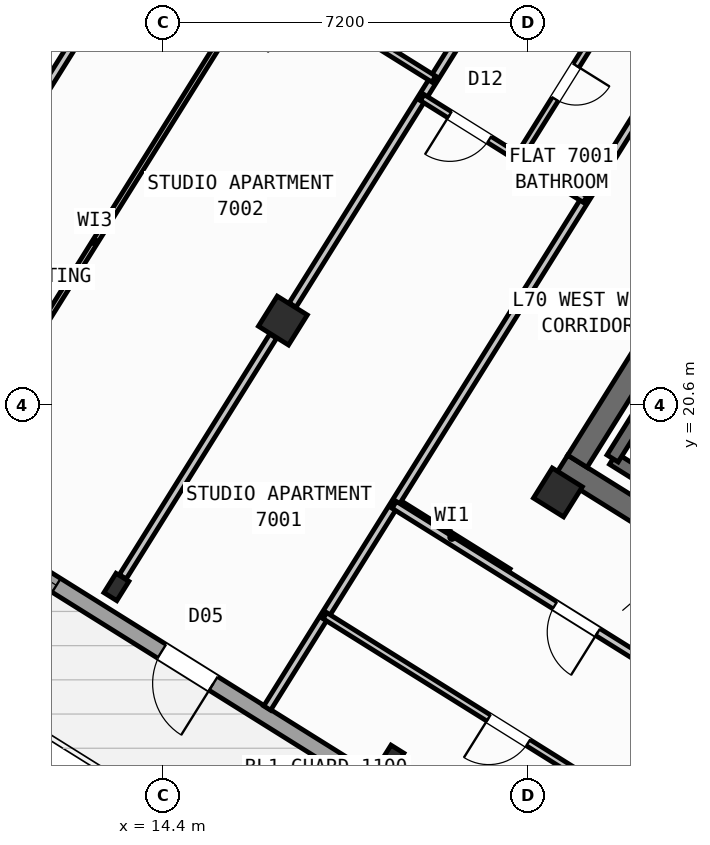
"""IFC4 building model, lengths in metres.
Left out: names, types, materials, properties, quantities, classifications, styles, units other than length and angle.
Written with IfcOpenShell. Run it as: python <this file> out.ifc"""

import sys

from ifc_helpers import new_model, si_unit, direction, frame, frame_2d, origin, origin_2d, place, context, subcontext, project, spatial, rectangle, hollow_rectangle, i_section, extrude, source, transform, mapped, element, fill, save


model = new_model("IFC4")
c1 = context("Model", 3, precision=1e-05, world=origin(), true_north=direction((0.0, 1.0)))
c2 = subcontext(c1, "Body", "Model", "MODEL_VIEW")
j1 = project(units=[si_unit("LENGTHUNIT", "METRE"), si_unit("PLANEANGLEUNIT", "RADIAN")], contexts=[c1])
p1 = place(None, origin())
s1 = spatial("IfcSite", under=j1, at=p1, CompositionType="ELEMENT")
p2 = place(p1, origin())
s2 = spatial("IfcBuilding", under=s1, at=p2, CompositionType="ELEMENT")
p3 = place(p2, frame((0.0, 0.0, 277.2)))
s3 = spatial("IfcBuildingStorey", under=s2, at=p3, CompositionType="ELEMENT", Elevation=277.2)
p4 = place(p3, frame((33.324, 12.503, 0.0), z_axis=(0.0, 0.0, 1.0), x_axis=(-0.848043529849, 0.529926571782, 0.0)))
e1 = element("IfcWall", 1, at=p4, inside=s3, PredefinedType="SHEAR", context=c2, shape_type="SweptSolid", body=[
    extrude(rectangle(XDim=13.04, YDim=0.45, at=frame_2d((6.52, 0.0))), origin(), (0.0, 0.0, 1.0), 3.35),
])
p5 = place(p3, frame((26.007, 24.976, 0.0), z_axis=(0.0, 0.0, 1.0), x_axis=(-0.529931155655, -0.848040665456, 0.0)))
e2 = element("IfcWall", 2, at=p5, inside=s3, PredefinedType="SHEAR", context=c2, shape_type="SweptSolid", body=[
    extrude(rectangle(XDim=6.475, YDim=0.45, at=frame_2d((3.238, 0.0))), origin(), (0.0, 0.0, 1.0), 3.35),
])
m1 = source(origin(), c2, "Body", "SweptSolid", [
    extrude(hollow_rectangle(XDim=0.7, YDim=0.7, WallThickness=0.028, at=origin_2d()), origin(), (0.0, 0.0, 1.0), 3.6),
])
p6 = place(p3, frame((22.191, 18.87, 0.0), z_axis=(0.0, 0.0, 1.0), x_axis=(-0.848048096156, 0.529919264233, 0.0)))
e3 = element("IfcColumn", 3, at=p6, inside=s3, PredefinedType="COLUMN", context=c2, shape_type="MappedRepresentation", body=[
    mapped(m1, transform((0.0, 0.0, 0.0), scale=1.0)),
])
m2 = source(origin(), c2, "Body", "SweptSolid", [
    extrude(i_section(OverallWidth=0.3, OverallDepth=0.45, WebThickness=0.014, FlangeThickness=0.026, at=origin_2d()), origin(), (0.0, 0.0, 1.0), 3.6),
])
p7 = place(p3, frame((18.906, 13.612, 0.0), z_axis=(0.0, 0.0, 1.0), x_axis=(-0.848048096156, 0.529919264233, 0.0)))
e4 = element("IfcColumn", 4, at=p7, inside=s3, PredefinedType="COLUMN", context=c2, shape_type="MappedRepresentation", body=[
    mapped(m2, transform((0.0, 0.0, 0.0), scale=1.0)),
])
p8 = place(p3, frame((16.764, 22.261, 0.0), z_axis=(0.0, 0.0, 1.0), x_axis=(-0.848048096156, 0.529919264233, 0.0)))
e5 = element("IfcColumn", 5, at=p8, inside=s3, PredefinedType="COLUMN", context=c2, shape_type="MappedRepresentation", body=[
    mapped(m1, transform((0.0, 0.0, 0.0), scale=1.0)),
])
p9 = place(p3, frame((13.478, 17.003, 0.0), z_axis=(0.0, 0.0, 1.0), x_axis=(-0.848048096156, 0.529919264233, 0.0)))
e6 = element("IfcColumn", 6, at=p9, inside=s3, PredefinedType="COLUMN", context=c2, shape_type="MappedRepresentation", body=[
    mapped(m2, transform((0.0, 0.0, 0.0), scale=1.0)),
])
p10 = place(p3, frame((29.268, 6.429, 0.0), z_axis=(0.0, 0.0, 1.0), x_axis=(-0.848049971435, 0.529916263149, 0.0)))
e7 = element("IfcWall", 7, at=p10, inside=s3, PredefinedType="STANDARD", context=c2, shape_type="SweptSolid", body=[
    extrude(rectangle(XDim=31.588, YDim=0.32, at=frame_2d((15.794, 0.0))), origin(), (0.0, 0.0, 1.0), 3.35),
])
p11 = place(p10, frame((16.362, 0.0, 0.0)))
e8 = element("IfcOpeningElement", 8, at=p11, cuts=e7, PredefinedType="OPENING", context=c2, shape_type="SweptSolid", body=[
    extrude(rectangle(XDim=1.2, YDim=2.15, at=frame_2d((0.6, 1.075))), frame((0.0, 0.17, 0.0), z_axis=(0.0, -1.0, 0.0), x_axis=(1.0, 0.0, 0.0)), (0.0, 0.0, 1.0), 0.34),
])
p12 = place(p10, frame((3.859, 0.0, 0.9)))
e9 = element("IfcOpeningElement", 9, at=p12, cuts=e7, PredefinedType="OPENING", context=c2, shape_type="SweptSolid", body=[
    extrude(rectangle(XDim=1.65, YDim=1.45, at=frame_2d((0.825, 0.725))), frame((0.0, 0.17, 0.0), z_axis=(0.0, -1.0, 0.0), x_axis=(1.0, 0.0, 0.0)), (0.0, 0.0, 1.0), 0.34),
])
p13 = place(p10, frame((10.519, 0.0, 0.9)))
e10 = element("IfcOpeningElement", 10, at=p13, cuts=e7, PredefinedType="OPENING", context=c2, shape_type="SweptSolid", body=[
    extrude(rectangle(XDim=1.65, YDim=1.45, at=frame_2d((0.825, 0.725))), frame((0.0, 0.17, 0.0), z_axis=(0.0, -1.0, 0.0), x_axis=(1.0, 0.0, 0.0)), (0.0, 0.0, 1.0), 0.34),
])
p14 = place(p10, frame((20.015, 0.0, 0.95)))
e11 = element("IfcOpeningElement", 11, at=p14, cuts=e7, PredefinedType="OPENING", context=c2, shape_type="SweptSolid", body=[
    extrude(rectangle(XDim=1.95, YDim=1.35, at=frame_2d((0.975, 0.675))), frame((0.0, 0.17, 0.0), z_axis=(0.0, -1.0, 0.0), x_axis=(1.0, 0.0, 0.0)), (0.0, 0.0, 1.0), 0.34),
])
p15 = place(p10, frame((23.715, 0.0, 1.0)))
e12 = element("IfcOpeningElement", 12, at=p15, cuts=e7, PredefinedType="OPENING", context=c2, shape_type="SweptSolid", body=[
    extrude(rectangle(XDim=0.9, YDim=1.25, at=frame_2d((0.45, 0.625))), frame((0.0, 0.17, 0.0), z_axis=(0.0, -1.0, 0.0), x_axis=(1.0, 0.0, 0.0)), (0.0, 0.0, 1.0), 0.34),
])
p16 = place(p10, frame((27.706, 0.0, 0.9)))
e13 = element("IfcOpeningElement", 13, at=p16, cuts=e7, PredefinedType="OPENING", context=c2, shape_type="SweptSolid", body=[
    extrude(rectangle(XDim=1.65, YDim=1.45, at=frame_2d((0.825, 0.725))), frame((0.0, 0.17, 0.0), z_axis=(0.0, -1.0, 0.0), x_axis=(1.0, 0.0, 0.0)), (0.0, 0.0, 1.0), 0.34),
])
p17 = place(p3, frame((2.415, 23.452, 0.0), z_axis=(0.0, 0.0, 1.0), x_axis=(0.52991049553, 0.848053575387, 0.0)))
e14 = element("IfcWall", 14, at=p17, inside=s3, PredefinedType="STANDARD", context=c2, shape_type="SweptSolid", body=[
    extrude(rectangle(XDim=21.587, YDim=0.32, at=frame_2d((10.794, 0.0))), origin(), (0.0, 0.0, 1.0), 3.35),
])
p18 = place(p17, frame((2.368, 0.0, 0.9)))
e15 = element("IfcOpeningElement", 15, at=p18, cuts=e14, PredefinedType="OPENING", context=c2, shape_type="SweptSolid", body=[
    extrude(rectangle(XDim=1.65, YDim=1.45, at=frame_2d((0.825, 0.725))), frame((0.0, 0.17, 0.0), z_axis=(0.0, -1.0, 0.0), x_axis=(1.0, 0.0, 0.0)), (0.0, 0.0, 1.0), 0.34),
])
p19 = place(p17, frame((8.094, 0.0, 0.9)))
e16 = element("IfcOpeningElement", 16, at=p19, cuts=e14, PredefinedType="OPENING", context=c2, shape_type="SweptSolid", body=[
    extrude(rectangle(XDim=1.35, YDim=1.45, at=frame_2d((0.675, 0.725))), frame((0.0, 0.17, 0.0), z_axis=(0.0, -1.0, 0.0), x_axis=(1.0, 0.0, 0.0)), (0.0, 0.0, 1.0), 0.34),
])
p20 = place(p17, frame((11.044, 0.0, 0.9)))
e17 = element("IfcOpeningElement", 17, at=p20, cuts=e14, PredefinedType="OPENING", context=c2, shape_type="SweptSolid", body=[
    extrude(rectangle(XDim=1.35, YDim=1.45, at=frame_2d((0.675, 0.725))), frame((0.0, 0.17, 0.0), z_axis=(0.0, -1.0, 0.0), x_axis=(1.0, 0.0, 0.0)), (0.0, 0.0, 1.0), 0.34),
])
p21 = place(p17, frame((18.809, 0.0, 1.0)))
e18 = element("IfcOpeningElement", 18, at=p21, cuts=e14, PredefinedType="OPENING", context=c2, shape_type="SweptSolid", body=[
    extrude(rectangle(XDim=0.9, YDim=1.25, at=frame_2d((0.45, 0.625))), frame((0.0, 0.17, 0.0), z_axis=(0.0, -1.0, 0.0), x_axis=(1.0, 0.0, 0.0)), (0.0, 0.0, 1.0), 0.34),
])
p22 = place(p3, frame((14.138, 41.825, 0.0), z_axis=(0.0, 0.0, 1.0), x_axis=(0.848046498049, -0.529921821731, 0.0)))
e19 = element("IfcWall", 19, at=p22, inside=s3, PredefinedType="STANDARD", context=c2, shape_type="SweptSolid", body=[
    extrude(rectangle(XDim=31.588, YDim=0.32, at=frame_2d((15.794, 0.0))), origin(), (0.0, 0.0, 1.0), 3.35),
])
p23 = place(p22, frame((3.568, 0.0, 0.0)))
e20 = element("IfcOpeningElement", 20, at=p23, cuts=e19, PredefinedType="OPENING", context=c2, shape_type="SweptSolid", body=[
    extrude(rectangle(XDim=1.05, YDim=2.15, at=frame_2d((0.525, 1.075))), frame((0.0, 0.17, 0.0), z_axis=(0.0, -1.0, 0.0), x_axis=(1.0, 0.0, 0.0)), (0.0, 0.0, 1.0), 0.34),
])
p24 = place(p22, frame((1.046, 0.0, 0.9)))
e21 = element("IfcOpeningElement", 21, at=p24, cuts=e19, PredefinedType="OPENING", context=c2, shape_type="SweptSolid", body=[
    extrude(rectangle(XDim=1.65, YDim=1.45, at=frame_2d((0.825, 0.725))), frame((0.0, 0.17, 0.0), z_axis=(0.0, -1.0, 0.0), x_axis=(1.0, 0.0, 0.0)), (0.0, 0.0, 1.0), 0.34),
])
p25 = place(p22, frame((8.61, 0.0, 0.9)))
e22 = element("IfcOpeningElement", 22, at=p25, cuts=e19, PredefinedType="OPENING", context=c2, shape_type="SweptSolid", body=[
    extrude(rectangle(XDim=1.35, YDim=1.45, at=frame_2d((0.675, 0.725))), frame((0.0, 0.17, 0.0), z_axis=(0.0, -1.0, 0.0), x_axis=(1.0, 0.0, 0.0)), (0.0, 0.0, 1.0), 0.34),
])
p26 = place(p22, frame((13.599, 0.0, 0.95)))
e23 = element("IfcOpeningElement", 23, at=p26, cuts=e19, PredefinedType="OPENING", context=c2, shape_type="SweptSolid", body=[
    extrude(rectangle(XDim=1.95, YDim=1.35, at=frame_2d((0.975, 0.675))), frame((0.0, 0.17, 0.0), z_axis=(0.0, -1.0, 0.0), x_axis=(1.0, 0.0, 0.0)), (0.0, 0.0, 1.0), 0.34),
])
p27 = place(p22, frame((17.154, 0.0, 1.0)))
e24 = element("IfcOpeningElement", 24, at=p27, cuts=e19, PredefinedType="OPENING", context=c2, shape_type="SweptSolid", body=[
    extrude(rectangle(XDim=0.9, YDim=1.25, at=frame_2d((0.45, 0.625))), frame((0.0, 0.17, 0.0), z_axis=(0.0, -1.0, 0.0), x_axis=(1.0, 0.0, 0.0)), (0.0, 0.0, 1.0), 0.34),
])
p28 = place(p22, frame((21.719, 0.0, 0.9)))
e25 = element("IfcOpeningElement", 25, at=p28, cuts=e19, PredefinedType="OPENING", context=c2, shape_type="SweptSolid", body=[
    extrude(rectangle(XDim=1.65, YDim=1.45, at=frame_2d((0.825, 0.725))), frame((0.0, 0.17, 0.0), z_axis=(0.0, -1.0, 0.0), x_axis=(1.0, 0.0, 0.0)), (0.0, 0.0, 1.0), 0.34),
])
p29 = place(p22, frame((27.419, 0.0, 0.9)))
e26 = element("IfcOpeningElement", 26, at=p29, cuts=e19, PredefinedType="OPENING", context=c2, shape_type="SweptSolid", body=[
    extrude(rectangle(XDim=1.65, YDim=1.45, at=frame_2d((0.825, 0.725))), frame((0.0, 0.17, 0.0), z_axis=(0.0, -1.0, 0.0), x_axis=(1.0, 0.0, 0.0)), (0.0, 0.0, 1.0), 0.34),
])
p30 = place(p3, frame((29.605, 15.581, 0.0), z_axis=(0.0, 0.0, 1.0), x_axis=(-0.848036911448, 0.529937163087, 0.0)))
e27 = element("IfcWall", 27, at=p30, inside=s3, PredefinedType="SHEAR", context=c2, shape_type="SweptSolid", body=[
    extrude(rectangle(XDim=7.46, YDim=0.26, at=frame_2d((3.73, 0.0))), origin(), (0.0, 0.0, 1.0), 3.35),
])
p31 = place(p3, frame((24.945, 22.22, 0.0), z_axis=(0.0, 0.0, 1.0), x_axis=(-0.529908658664, -0.84805472316, 0.0)))
e28 = element("IfcWall", 28, at=p31, inside=s3, PredefinedType="SHEAR", context=c2, shape_type="SweptSolid", body=[
    extrude(rectangle(XDim=3.16, YDim=0.26, at=frame_2d((1.58, 0.0))), origin(), (0.0, 0.0, 1.0), 3.35),
])
p32 = place(p3, frame((21.206, 17.292, 0.0), z_axis=(0.0, 0.0, 1.0), x_axis=(-0.848050851465, 0.529914854792, 0.0)))
e29 = element("IfcWall", 29, at=p32, inside=s3, PredefinedType="PARTITIONING", context=c2, shape_type="SweptSolid", body=[
    extrude(rectangle(XDim=2.61, YDim=0.16, at=frame_2d((1.305, 0.0))), origin(), (0.0, 0.0, 1.0), 3.34),
])
p33 = place(p3, frame((24.588, 27.631, 0.0), z_axis=(0.0, 0.0, 1.0), x_axis=(-0.529914586043, -0.848051019396, 0.0)))
e30 = element("IfcWall", 30, at=p33, inside=s3, PredefinedType="PARTITIONING", context=c2, shape_type="SweptSolid", body=[
    extrude(rectangle(XDim=15.35, YDim=0.16, at=frame_2d((7.675, 0.0))), origin(), (0.0, 0.0, 1.0), 3.34),
])
p34 = place(p3, frame((20.44, 28.145, 0.0), z_axis=(0.0, 0.0, 1.0), x_axis=(-0.529938869374, -0.84803584519, 0.0)))
e31 = element("IfcWall", 31, at=p34, inside=s3, PredefinedType="PARTITIONING", context=c2, shape_type="SweptSolid", body=[
    extrude(rectangle(XDim=6.576, YDim=0.16, at=frame_2d((3.288, 0.0))), origin(), (0.0, 0.0, 1.0), 2.875),
])
p35 = place(p3, frame((16.572, 21.954, 0.0), z_axis=(0.0, 0.0, 1.0), x_axis=(-0.529904903214, -0.848057069748, 0.0)))
e32 = element("IfcWall", 32, at=p35, inside=s3, PredefinedType="PARTITIONING", context=c2, shape_type="SweptSolid", body=[
    extrude(rectangle(XDim=5.601, YDim=0.16, at=frame_2d((2.801, 0.0))), origin(), (0.0, 0.0, 1.0), 2.875),
])
p36 = place(p3, frame((22.728, 24.654, 0.0), z_axis=(0.0, 0.0, 1.0), x_axis=(-0.848059820872, 0.529900500304, 0.0)))
e33 = element("IfcWall", 33, at=p36, inside=s3, PredefinedType="PLUMBINGWALL", context=c2, shape_type="SweptSolid", body=[
    extrude(rectangle(XDim=3.79, YDim=0.14, at=frame_2d((1.895, 0.0))), origin(), (0.0, 0.0, 1.0), 3.34),
])
p37 = place(p36, frame((2.23, 0.0, 0.0)))
e34 = element("IfcOpeningElement", 34, at=p37, cuts=e33, PredefinedType="OPENING", context=c2, shape_type="SweptSolid", body=[
    extrude(rectangle(XDim=0.92, YDim=2.08, at=frame_2d((0.46, 1.04))), frame((0.0, 0.08, 0.0), z_axis=(0.0, -1.0, 0.0), x_axis=(1.0, 0.0, 0.0)), (0.0, 0.0, 1.0), 0.16),
])
p38 = place(p3, frame((23.273, 28.452, 0.0), z_axis=(0.0, 0.0, 1.0), x_axis=(-0.529867639402, -0.848080352747, 0.0)))
e35 = element("IfcWall", 35, at=p38, inside=s3, PredefinedType="PLUMBINGWALL", context=c2, shape_type="SweptSolid", body=[
    extrude(rectangle(XDim=3.51, YDim=0.14, at=frame_2d((1.755, 0.0))), origin(), (0.0, 0.0, 1.0), 3.025),
])
p39 = place(p38, frame((1.365, 0.0, 0.0)))
e36 = element("IfcOpeningElement", 36, at=p39, cuts=e35, PredefinedType="OPENING", context=c2, shape_type="SweptSolid", body=[
    extrude(rectangle(XDim=0.78, YDim=2.05, at=frame_2d((0.39, 1.025))), frame((0.0, 0.08, 0.0), z_axis=(0.0, -1.0, 0.0), x_axis=(1.0, 0.0, 0.0)), (0.0, 0.0, 1.0), 0.16),
])
p40 = place(p3, frame((15.013, 31.537, 0.0), z_axis=(0.0, 0.0, 1.0), x_axis=(-0.529922185033, -0.848046271031, 0.0)))
e37 = element("IfcWall", 37, at=p40, inside=s3, PredefinedType="PARTITIONING", context=c2, shape_type="SweptSolid", body=[
    extrude(rectangle(XDim=6.576, YDim=0.16, at=frame_2d((3.288, 0.0))), origin(), (0.0, 0.0, 1.0), 2.875),
])
p41 = place(p3, frame((19.742, 27.027, 0.0), z_axis=(0.0, 0.0, 1.0), x_axis=(-0.848039019877, 0.529933789039, 0.0)))
e38 = element("IfcWall", 38, at=p41, inside=s3, PredefinedType="PLUMBINGWALL", context=c2, shape_type="SweptSolid", body=[
    extrude(rectangle(XDim=6.4, YDim=0.14, at=frame_2d((3.2, 0.0))), origin(), (0.0, 0.0, 1.0), 3.34),
])
p42 = place(p41, frame((2.824, 0.0, 0.0)))
e39 = element("IfcOpeningElement", 39, at=p42, cuts=e38, PredefinedType="OPENING", context=c2, shape_type="SweptSolid", body=[
    extrude(rectangle(XDim=0.78, YDim=2.05, at=frame_2d((0.39, 1.025))), frame((0.0, 0.08, 0.0), z_axis=(0.0, -1.0, 0.0), x_axis=(1.0, 0.0, 0.0)), (0.0, 0.0, 1.0), 0.16),
])
p43 = place(p3, frame((16.377, 29.13, 0.0), z_axis=(0.0, 0.0, 1.0), x_axis=(-0.529923687379, -0.848045332252, 0.0)))
e40 = element("IfcWall", 40, at=p43, inside=s3, PredefinedType="PARTITIONING", context=c2, shape_type="SweptSolid", body=[
    extrude(rectangle(XDim=12.54, YDim=0.11, at=frame_2d((6.27, 0.0))), origin(), (0.0, 0.0, 1.0), 3.34),
])
p44 = place(p43, frame((0.35, 0.0, 0.0)))
e41 = element("IfcOpeningElement", 41, at=p44, cuts=e40, PredefinedType="OPENING", context=c2, shape_type="SweptSolid", body=[
    extrude(rectangle(XDim=0.92, YDim=2.08, at=frame_2d((0.46, 1.04))), frame((0.0, 0.065, 0.0), z_axis=(0.0, -1.0, 0.0), x_axis=(1.0, 0.0, 0.0)), (0.0, 0.0, 1.0), 0.13),
])
p45 = place(p3, frame((32.164, 10.374, 0.0), z_axis=(0.0, 0.0, 1.0), x_axis=(-0.848044107957, 0.529925646633, 0.0)))
e42 = element("IfcWall", 42, at=p45, inside=s3, PredefinedType="PARTITIONING", context=c2, shape_type="SweptSolid", body=[
    extrude(rectangle(XDim=15.57, YDim=0.16, at=frame_2d((7.785, 0.0))), origin(), (0.0, 0.0, 1.0), 3.34),
])
p46 = place(p45, frame((10.83, 0.0, 0.0)))
e43 = element("IfcOpeningElement", 43, at=p46, cuts=e42, PredefinedType="OPENING", context=c2, shape_type="SweptSolid", body=[
    extrude(rectangle(XDim=1.0, YDim=2.1, at=frame_2d((0.5, 1.05))), frame((0.0, 0.09, 0.0), z_axis=(0.0, -1.0, 0.0), x_axis=(1.0, 0.0, 0.0)), (0.0, 0.0, 1.0), 0.18),
])
p47 = place(p3, frame((29.72, 8.859, 0.0), z_axis=(0.0, 0.0, 1.0), x_axis=(-0.848049134363, 0.529917602752, 0.0)))
e44 = element("IfcWall", 44, at=p47, inside=s3, PredefinedType="PLUMBINGWALL", context=c2, shape_type="SweptSolid", body=[
    extrude(rectangle(XDim=14.3, YDim=0.14, at=frame_2d((7.15, 0.0))), origin(), (0.0, 0.0, 1.0), 3.34),
])
p48 = place(p47, frame((9.57, 0.0, 0.0)))
e45 = element("IfcOpeningElement", 45, at=p48, cuts=e44, PredefinedType="OPENING", context=c2, shape_type="SweptSolid", body=[
    extrude(rectangle(XDim=0.92, YDim=2.08, at=frame_2d((0.46, 1.04))), frame((0.0, 0.08, 0.0), z_axis=(0.0, -1.0, 0.0), x_axis=(1.0, 0.0, 0.0)), (0.0, 0.0, 1.0), 0.16),
])
m3 = source(origin(), c2, "Body", "SweptSolid", [
    extrude(rectangle(XDim=1.2, YDim=2.15, at=frame_2d((0.6, 1.075))), frame((0.0, 0.025, 0.0), z_axis=(0.0, -1.0, 0.0), x_axis=(1.0, 0.0, 0.0)), (0.0, 0.0, 1.0), 0.05),
])
p49 = place(p11, origin())
e46 = element("IfcDoor", 46, at=p49, inside=s3, OperationType="SINGLE_SWING_LEFT", PredefinedType="DOOR", context=c2, shape_type="MappedRepresentation", body=[
    mapped(m3, transform((0.0, 0.0, 0.0), scale=1.0)),
])
fill(e8, e46)
m4 = source(origin(), c2, "Body", "SweptSolid", [
    extrude(rectangle(XDim=1.95, YDim=1.35, at=frame_2d((0.975, 0.675))), frame((0.0, 0.03, 0.0), z_axis=(0.0, -1.0, 0.0), x_axis=(1.0, 0.0, 0.0)), (0.0, 0.0, 1.0), 0.06),
])
p50 = place(p14, origin())
e47 = element("IfcWindow", 47, at=p50, inside=s3, PartitioningType="SINGLE_PANEL", PredefinedType="WINDOW", context=c2, shape_type="MappedRepresentation", body=[
    mapped(m4, transform((0.0, 0.0, 0.0), scale=1.0)),
])
fill(e11, e47)
m5 = source(origin(), c2, "Body", "SweptSolid", [
    extrude(rectangle(XDim=0.92, YDim=2.08, at=frame_2d((0.46, 1.04))), frame((0.0, 0.025, 0.0), z_axis=(0.0, -1.0, 0.0), x_axis=(1.0, 0.0, 0.0)), (0.0, 0.0, 1.0), 0.05),
])
p51 = place(p37, origin())
e48 = element("IfcDoor", 48, at=p51, inside=s3, OperationType="SINGLE_SWING_RIGHT", PredefinedType="DOOR", context=c2, shape_type="MappedRepresentation", body=[
    mapped(m5, transform((0.0, 0.0, 0.0), scale=1.0)),
])
fill(e34, e48)
m6 = source(origin(), c2, "Body", "SweptSolid", [
    extrude(rectangle(XDim=0.78, YDim=2.05, at=frame_2d((0.39, 1.025))), frame((0.0, 0.025, 0.0), z_axis=(0.0, -1.0, 0.0), x_axis=(1.0, 0.0, 0.0)), (0.0, 0.0, 1.0), 0.05),
])
p52 = place(p39, origin())
e49 = element("IfcDoor", 49, at=p52, inside=s3, OperationType="SINGLE_SWING_LEFT", PredefinedType="DOOR", context=c2, shape_type="MappedRepresentation", body=[
    mapped(m6, transform((0.0, 0.0, 0.0), scale=1.0)),
])
fill(e36, e49)
m7 = source(origin(), c2, "Body", "SweptSolid", [
    extrude(rectangle(XDim=1.0, YDim=2.1, at=frame_2d((0.5, 1.05))), frame((0.0, 0.025, 0.0), z_axis=(0.0, -1.0, 0.0), x_axis=(1.0, 0.0, 0.0)), (0.0, 0.0, 1.0), 0.05),
])
p53 = place(p46, origin())
e50 = element("IfcDoor", 50, at=p53, inside=s3, OperationType="SINGLE_SWING_LEFT", PredefinedType="DOOR", context=c2, shape_type="MappedRepresentation", body=[
    mapped(m7, transform((0.0, 0.0, 0.0), scale=1.0)),
])
fill(e43, e50)
p54 = place(p48, origin())
e51 = element("IfcDoor", 51, at=p54, inside=s3, OperationType="SINGLE_SWING_RIGHT", PredefinedType="DOOR", context=c2, shape_type="MappedRepresentation", body=[
    mapped(m5, transform((0.0, 0.0, 0.0), scale=1.0)),
])
fill(e45, e51)
save(model, sys.argv[1])
